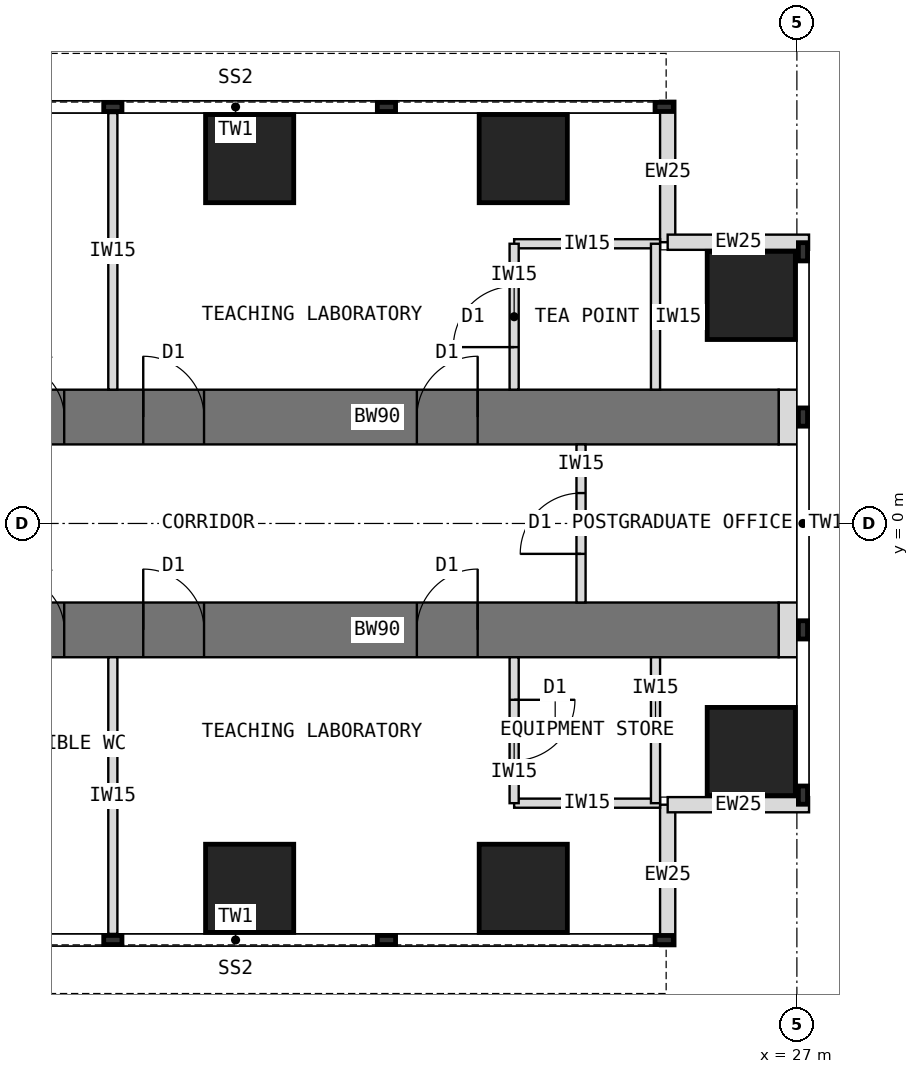
"""IFC4 building model, lengths in metres.
Left out: names, types, materials, properties, quantities, classifications, styles, units other than length and angle.
Written with IfcOpenShell. Run it as: python <this file> out.ifc"""

import sys

from ifc_helpers import new_model, si_unit, direction, frame, frame_2d, origin, origin_2d, place, context, subcontext, project, spatial, rectangle, extrude, element, fill, save


model = new_model("IFC4")
c1 = context("Model", 3, precision=1e-05, world=origin(), true_north=direction((0.0, 1.0)))
c2 = subcontext(c1, "Body", "Model", "MODEL_VIEW")
j1 = project(units=[si_unit("LENGTHUNIT", "METRE"), si_unit("PLANEANGLEUNIT", "RADIAN")], contexts=[c1])
p1 = place(None, origin())
s1 = spatial("IfcSite", under=j1, at=p1, CompositionType="ELEMENT")
p2 = place(p1, origin())
s2 = spatial("IfcBuilding", under=s1, at=p2, CompositionType="ELEMENT")
p3 = place(p2, frame((0.0, 0.0, 56.5)))
s3 = spatial("IfcBuildingStorey", under=s2, at=p3, CompositionType="ELEMENT", Elevation=56.5)
p4 = place(p3, frame((13.5, 1.75, 0.0), z_axis=(0.0, 0.0, 1.0), x_axis=(1.0, 0.0, 0.0)))
e1 = element("IfcWall", 1, at=p4, inside=s3, PredefinedType="SHEAR", context=c2, shape_type="SweptSolid", body=[
    extrude(rectangle(XDim=13.2, YDim=0.9, at=frame_2d((6.6, 0.0))), origin(), (0.0, 0.0, 1.0), 4.0),
])
p5 = place(p4, frame((0.55, 0.0, 0.0)))
e2 = element("IfcOpeningElement", 2, at=p5, cuts=e1, PredefinedType="OPENING", context=c2, shape_type="SweptSolid", body=[
    extrude(rectangle(XDim=0.9, YDim=2.1, at=frame_2d((0.45, 1.05))), frame((0.0, 0.46, 0.0), z_axis=(0.0, -1.0, 0.0), x_axis=(1.0, 0.0, 0.0)), (0.0, 0.0, 1.0), 0.92),
])
p6 = place(p4, frame((2.75, 0.0, 0.0)))
e3 = element("IfcOpeningElement", 3, at=p6, cuts=e1, PredefinedType="OPENING", context=c2, shape_type="SweptSolid", body=[
    extrude(rectangle(XDim=1.0, YDim=2.1, at=frame_2d((0.5, 1.05))), frame((0.0, 0.46, 0.0), z_axis=(0.0, -1.0, 0.0), x_axis=(1.0, 0.0, 0.0)), (0.0, 0.0, 1.0), 0.92),
])
p7 = place(p4, frame((7.25, 0.0, 0.0)))
e4 = element("IfcOpeningElement", 4, at=p7, cuts=e1, PredefinedType="OPENING", context=c2, shape_type="SweptSolid", body=[
    extrude(rectangle(XDim=1.0, YDim=2.1, at=frame_2d((0.5, 1.05))), frame((0.0, 0.46, 0.0), z_axis=(0.0, -1.0, 0.0), x_axis=(1.0, 0.0, 0.0)), (0.0, 0.0, 1.0), 0.92),
])
p8 = place(p3, frame((13.5, -1.75, 0.0), z_axis=(0.0, 0.0, 1.0), x_axis=(1.0, 0.0, 0.0)))
e5 = element("IfcWall", 5, at=p8, inside=s3, PredefinedType="SHEAR", context=c2, shape_type="SweptSolid", body=[
    extrude(rectangle(XDim=13.2, YDim=0.9, at=frame_2d((6.6, 0.0))), origin(), (0.0, 0.0, 1.0), 4.0),
])
p9 = place(p8, frame((0.55, 0.0, 0.0)))
e6 = element("IfcOpeningElement", 6, at=p9, cuts=e5, PredefinedType="OPENING", context=c2, shape_type="SweptSolid", body=[
    extrude(rectangle(XDim=0.9, YDim=2.1, at=frame_2d((0.45, 1.05))), frame((0.0, 0.46, 0.0), z_axis=(0.0, -1.0, 0.0), x_axis=(1.0, 0.0, 0.0)), (0.0, 0.0, 1.0), 0.92),
])
p10 = place(p8, frame((2.75, 0.0, 0.0)))
e7 = element("IfcOpeningElement", 7, at=p10, cuts=e5, PredefinedType="OPENING", context=c2, shape_type="SweptSolid", body=[
    extrude(rectangle(XDim=1.0, YDim=2.1, at=frame_2d((0.5, 1.05))), frame((0.0, 0.46, 0.0), z_axis=(0.0, -1.0, 0.0), x_axis=(1.0, 0.0, 0.0)), (0.0, 0.0, 1.0), 0.92),
])
p11 = place(p8, frame((7.25, 0.0, 0.0)))
e8 = element("IfcOpeningElement", 8, at=p11, cuts=e5, PredefinedType="OPENING", context=c2, shape_type="SweptSolid", body=[
    extrude(rectangle(XDim=1.0, YDim=2.1, at=frame_2d((0.5, 1.05))), frame((0.0, 0.46, 0.0), z_axis=(0.0, -1.0, 0.0), x_axis=(1.0, 0.0, 0.0)), (0.0, 0.0, 1.0), 0.92),
])
for number, where, z_axis, x_axis in (
    (9, (18.0, 6.0, 0.0), (0.0, 0.0, 1.0), (1.0, 0.0, 0.0)),
    (10, (18.0, -6.0, 0.0), (0.0, 0.0, 1.0), (1.0, 0.0, 0.0)),
    (11, (22.5, 6.0, 0.0), (0.0, 0.0, 1.0), (1.0, 0.0, 0.0)),
    (12, (22.5, -6.0, 0.0), (0.0, 0.0, 1.0), (1.0, 0.0, 0.0)),
    (13, (26.25, 3.75, 0.0), (0.0, 0.0, 1.0), (1.0, 0.0, 0.0)),
    (14, (26.25, -3.75, 0.0), (0.0, 0.0, 1.0), (1.0, 0.0, 0.0)),
):
    element("IfcColumn", number, at=place(p3, frame(where, z_axis=z_axis, x_axis=x_axis)), inside=s3, PredefinedType="COLUMN", context=c2, shape_type="SweptSolid", body=[
        extrude(rectangle(XDim=1.45, YDim=1.45, at=origin_2d()), origin(), (0.0, 0.0, 1.0), 4.0),
    ])
for number, where, z_axis, x_axis in (
    (15, (24.875, 6.95, 0.0), (0.0, 0.0, 1.0), (0.0, -1.0, 0.0)),
    (16, (24.875, 4.625, 0.0), (0.0, 0.0, 1.0), (1.0, 0.0, 0.0)),
    (17, (24.875, -6.95, 0.0), (0.0, 0.0, 1.0), (0.0, 1.0, 0.0)),
    (18, (24.875, -4.625, 0.0), (0.0, 0.0, 1.0), (1.0, 0.0, 0.0)),
):
    element("IfcWall", number, at=place(p3, frame(where, z_axis=z_axis, x_axis=x_axis)), inside=s3, PredefinedType="STANDARD", context=c2, shape_type="SweptSolid", body=[
        extrude(rectangle(XDim=2.325, YDim=0.25, at=frame_2d((1.163, 0.0))), origin(), (0.0, 0.0, 1.0), 3.8),
    ])
for number, where, z_axis, x_axis in (
    (19, (26.7, 1.75, 0.0), (0.0, 0.0, 1.0), (1.0, 0.0, 0.0)),
    (20, (26.7, -1.75, 0.0), (0.0, 0.0, 1.0), (1.0, 0.0, 0.0)),
):
    element("IfcWall", number, at=place(p3, frame(where, z_axis=z_axis, x_axis=x_axis)), inside=s3, PredefinedType="PARTITIONING", context=c2, shape_type="SweptSolid", body=[
        extrude(rectangle(XDim=0.31, YDim=0.9, at=frame_2d((0.155, 0.0))), origin(), (0.0, 0.0, 1.0), 3.8),
    ])
p12 = place(p3, frame((15.75, 2.2, 0.0), z_axis=(0.0, 0.0, 1.0), x_axis=(0.0, 1.0, 0.0)))
e21 = element("IfcWall", 21, at=p12, inside=s3, PredefinedType="PARTITIONING", context=c2, shape_type="SweptSolid", body=[
    extrude(rectangle(XDim=4.55, YDim=0.15, at=frame_2d((2.275, 0.0))), origin(), (0.0, 0.0, 1.0), 3.8),
])
p13 = place(p3, frame((22.35, 4.6, 0.0), z_axis=(0.0, 0.0, 1.0), x_axis=(1.0, 0.0, 0.0)))
e22 = element("IfcWall", 22, at=p13, inside=s3, PredefinedType="PARTITIONING", context=c2, shape_type="SweptSolid", body=[
    extrude(rectangle(XDim=2.4, YDim=0.15, at=frame_2d((1.2, 0.0))), origin(), (0.0, 0.0, 1.0), 3.8),
])
p14 = place(p3, frame((22.35, 2.2, 0.0), z_axis=(0.0, 0.0, 1.0), x_axis=(0.0, 1.0, 0.0)))
e23 = element("IfcWall", 23, at=p14, inside=s3, PredefinedType="PARTITIONING", context=c2, shape_type="SweptSolid", body=[
    extrude(rectangle(XDim=2.4, YDim=0.15, at=frame_2d((1.2, 0.0))), origin(), (0.0, 0.0, 1.0), 3.8),
])
p15 = place(p14, frame((0.7, 0.0, 0.0)))
e24 = element("IfcOpeningElement", 24, at=p15, cuts=e23, PredefinedType="OPENING", context=c2, shape_type="SweptSolid", body=[
    extrude(rectangle(XDim=1.0, YDim=2.1, at=frame_2d((0.5, 1.05))), frame((0.0, 0.085, 0.0), z_axis=(0.0, -1.0, 0.0), x_axis=(1.0, 0.0, 0.0)), (0.0, 0.0, 1.0), 0.17),
])
p16 = place(p3, frame((24.675, 2.2, 0.0), z_axis=(0.0, 0.0, 1.0), x_axis=(0.0, 1.0, 0.0)))
e25 = element("IfcWall", 25, at=p16, inside=s3, PredefinedType="PARTITIONING", context=c2, shape_type="SweptSolid", body=[
    extrude(rectangle(XDim=2.4, YDim=0.15, at=frame_2d((1.2, 0.0))), origin(), (0.0, 0.0, 1.0), 3.8),
])
p17 = place(p3, frame((15.75, -2.2, 0.0), z_axis=(0.0, 0.0, 1.0), x_axis=(0.0, -1.0, 0.0)))
e26 = element("IfcWall", 26, at=p17, inside=s3, PredefinedType="PARTITIONING", context=c2, shape_type="SweptSolid", body=[
    extrude(rectangle(XDim=4.55, YDim=0.15, at=frame_2d((2.275, 0.0))), origin(), (0.0, 0.0, 1.0), 3.8),
])
p18 = place(p3, frame((22.35, -4.6, 0.0), z_axis=(0.0, 0.0, 1.0), x_axis=(1.0, 0.0, 0.0)))
e27 = element("IfcWall", 27, at=p18, inside=s3, PredefinedType="PARTITIONING", context=c2, shape_type="SweptSolid", body=[
    extrude(rectangle(XDim=2.4, YDim=0.15, at=frame_2d((1.2, 0.0))), origin(), (0.0, 0.0, 1.0), 3.8),
])
p19 = place(p3, frame((22.35, -2.2, 0.0), z_axis=(0.0, 0.0, 1.0), x_axis=(0.0, -1.0, 0.0)))
e28 = element("IfcWall", 28, at=p19, inside=s3, PredefinedType="PARTITIONING", context=c2, shape_type="SweptSolid", body=[
    extrude(rectangle(XDim=2.4, YDim=0.15, at=frame_2d((1.2, 0.0))), origin(), (0.0, 0.0, 1.0), 3.8),
])
p20 = place(p19, frame((0.7, 0.0, 0.0)))
e29 = element("IfcOpeningElement", 29, at=p20, cuts=e28, PredefinedType="OPENING", context=c2, shape_type="SweptSolid", body=[
    extrude(rectangle(XDim=1.0, YDim=2.1, at=frame_2d((0.5, 1.05))), frame((0.0, 0.085, 0.0), z_axis=(0.0, -1.0, 0.0), x_axis=(1.0, 0.0, 0.0)), (0.0, 0.0, 1.0), 0.17),
])
p21 = place(p3, frame((24.675, -2.2, 0.0), z_axis=(0.0, 0.0, 1.0), x_axis=(0.0, -1.0, 0.0)))
e30 = element("IfcWall", 30, at=p21, inside=s3, PredefinedType="PARTITIONING", context=c2, shape_type="SweptSolid", body=[
    extrude(rectangle(XDim=2.4, YDim=0.15, at=frame_2d((1.2, 0.0))), origin(), (0.0, 0.0, 1.0), 3.8),
])
p22 = place(p3, frame((23.45, -1.3, 0.0), z_axis=(0.0, 0.0, 1.0), x_axis=(0.0, 1.0, 0.0)))
e31 = element("IfcWall", 31, at=p22, inside=s3, PredefinedType="PARTITIONING", context=c2, shape_type="SweptSolid", body=[
    extrude(rectangle(XDim=2.6, YDim=0.15, at=frame_2d((1.3, 0.0))), origin(), (0.0, 0.0, 1.0), 3.8),
])
p23 = place(p22, frame((0.8, 0.0, 0.0)))
e32 = element("IfcOpeningElement", 32, at=p23, cuts=e31, PredefinedType="OPENING", context=c2, shape_type="SweptSolid", body=[
    extrude(rectangle(XDim=1.0, YDim=2.1, at=frame_2d((0.5, 1.05))), frame((0.0, 0.085, 0.0), z_axis=(0.0, -1.0, 0.0), x_axis=(1.0, 0.0, 0.0)), (0.0, 0.0, 1.0), 0.17),
])
p24 = place(p15, origin())
e33 = element("IfcDoor", 33, at=p24, inside=s3, OperationType="SINGLE_SWING_LEFT", PredefinedType="DOOR", context=c2, shape_type="SweptSolid", body=[
    extrude(rectangle(XDim=1.0, YDim=2.1, at=frame_2d((0.5, 1.05))), frame((0.0, 0.025, 0.0), z_axis=(0.0, -1.0, 0.0), x_axis=(1.0, 0.0, 0.0)), (0.0, 0.0, 1.0), 0.05),
])
fill(e24, e33)
p25 = place(p20, origin())
e34 = element("IfcDoor", 34, at=p25, inside=s3, OperationType="SINGLE_SWING_LEFT", PredefinedType="DOOR", context=c2, shape_type="SweptSolid", body=[
    extrude(rectangle(XDim=1.0, YDim=2.1, at=frame_2d((0.5, 1.05))), frame((0.0, 0.025, 0.0), z_axis=(0.0, -1.0, 0.0), x_axis=(1.0, 0.0, 0.0)), (0.0, 0.0, 1.0), 0.05),
])
fill(e29, e34)
p26 = place(p23, origin())
e35 = element("IfcDoor", 35, at=p26, inside=s3, OperationType="SINGLE_SWING_LEFT", PredefinedType="DOOR", context=c2, shape_type="SweptSolid", body=[
    extrude(rectangle(XDim=1.0, YDim=2.1, at=frame_2d((0.5, 1.05))), frame((0.0, 0.025, 0.0), z_axis=(0.0, -1.0, 0.0), x_axis=(1.0, 0.0, 0.0)), (0.0, 0.0, 1.0), 0.05),
])
fill(e32, e35)
p27 = place(p5, origin())
e36 = element("IfcDoor", 36, at=p27, inside=s3, OperationType="SINGLE_SWING_LEFT", PredefinedType="DOOR", context=c2, shape_type="SweptSolid", body=[
    extrude(rectangle(XDim=0.82, YDim=2.06, at=frame_2d((0.45, 1.03))), frame((0.0, 0.025, 0.0), z_axis=(0.0, -1.0, 0.0), x_axis=(1.0, 0.0, 0.0)), (0.0, 0.0, 1.0), 0.05),
    extrude(rectangle(XDim=0.04, YDim=2.1, at=frame_2d((0.02, 1.05))), frame((0.0, 0.45, 0.0), z_axis=(0.0, -1.0, 0.0), x_axis=(1.0, 0.0, 0.0)), (0.0, 0.0, 1.0), 0.899),
    extrude(rectangle(XDim=0.04, YDim=2.1, at=frame_2d((0.88, 1.05))), frame((0.0, 0.45, 0.0), z_axis=(0.0, -1.0, 0.0), x_axis=(1.0, 0.0, 0.0)), (0.0, 0.0, 1.0), 0.899),
    extrude(rectangle(XDim=0.82, YDim=0.04, at=frame_2d((0.45, 2.08))), frame((0.0, 0.45, 0.0), z_axis=(0.0, -1.0, 0.0), x_axis=(1.0, 0.0, 0.0)), (0.0, 0.0, 1.0), 0.899),
])
fill(e2, e36)
p28 = place(p6, origin())
e37 = element("IfcDoor", 37, at=p28, inside=s3, OperationType="SINGLE_SWING_LEFT", PredefinedType="DOOR", context=c2, shape_type="SweptSolid", body=[
    extrude(rectangle(XDim=0.92, YDim=2.06, at=frame_2d((0.5, 1.03))), frame((0.0, 0.025, 0.0), z_axis=(0.0, -1.0, 0.0), x_axis=(1.0, 0.0, 0.0)), (0.0, 0.0, 1.0), 0.05),
    extrude(rectangle(XDim=0.04, YDim=2.1, at=frame_2d((0.02, 1.05))), frame((0.0, 0.45, 0.0), z_axis=(0.0, -1.0, 0.0), x_axis=(1.0, 0.0, 0.0)), (0.0, 0.0, 1.0), 0.899),
    extrude(rectangle(XDim=0.04, YDim=2.1, at=frame_2d((0.98, 1.05))), frame((0.0, 0.45, 0.0), z_axis=(0.0, -1.0, 0.0), x_axis=(1.0, 0.0, 0.0)), (0.0, 0.0, 1.0), 0.899),
    extrude(rectangle(XDim=0.92, YDim=0.04, at=frame_2d((0.5, 2.08))), frame((0.0, 0.45, 0.0), z_axis=(0.0, -1.0, 0.0), x_axis=(1.0, 0.0, 0.0)), (0.0, 0.0, 1.0), 0.899),
])
fill(e3, e37)
p29 = place(p7, origin())
e38 = element("IfcDoor", 38, at=p29, inside=s3, OperationType="SINGLE_SWING_RIGHT", PredefinedType="DOOR", context=c2, shape_type="SweptSolid", body=[
    extrude(rectangle(XDim=0.92, YDim=2.06, at=frame_2d((0.5, 1.03))), frame((0.0, 0.025, 0.0), z_axis=(0.0, -1.0, 0.0), x_axis=(1.0, 0.0, 0.0)), (0.0, 0.0, 1.0), 0.05),
    extrude(rectangle(XDim=0.04, YDim=2.1, at=frame_2d((0.02, 1.05))), frame((0.0, 0.45, 0.0), z_axis=(0.0, -1.0, 0.0), x_axis=(1.0, 0.0, 0.0)), (0.0, 0.0, 1.0), 0.899),
    extrude(rectangle(XDim=0.04, YDim=2.1, at=frame_2d((0.98, 1.05))), frame((0.0, 0.45, 0.0), z_axis=(0.0, -1.0, 0.0), x_axis=(1.0, 0.0, 0.0)), (0.0, 0.0, 1.0), 0.899),
    extrude(rectangle(XDim=0.92, YDim=0.04, at=frame_2d((0.5, 2.08))), frame((0.0, 0.45, 0.0), z_axis=(0.0, -1.0, 0.0), x_axis=(1.0, 0.0, 0.0)), (0.0, 0.0, 1.0), 0.899),
])
fill(e4, e38)
p30 = place(p9, origin())
e39 = element("IfcDoor", 39, at=p30, inside=s3, OperationType="SINGLE_SWING_LEFT", PredefinedType="DOOR", context=c2, shape_type="SweptSolid", body=[
    extrude(rectangle(XDim=0.82, YDim=2.06, at=frame_2d((0.45, 1.03))), frame((0.0, 0.025, 0.0), z_axis=(0.0, -1.0, 0.0), x_axis=(1.0, 0.0, 0.0)), (0.0, 0.0, 1.0), 0.05),
    extrude(rectangle(XDim=0.04, YDim=2.1, at=frame_2d((0.02, 1.05))), frame((0.0, 0.45, 0.0), z_axis=(0.0, -1.0, 0.0), x_axis=(1.0, 0.0, 0.0)), (0.0, 0.0, 1.0), 0.899),
    extrude(rectangle(XDim=0.04, YDim=2.1, at=frame_2d((0.88, 1.05))), frame((0.0, 0.45, 0.0), z_axis=(0.0, -1.0, 0.0), x_axis=(1.0, 0.0, 0.0)), (0.0, 0.0, 1.0), 0.899),
    extrude(rectangle(XDim=0.82, YDim=0.04, at=frame_2d((0.45, 2.08))), frame((0.0, 0.45, 0.0), z_axis=(0.0, -1.0, 0.0), x_axis=(1.0, 0.0, 0.0)), (0.0, 0.0, 1.0), 0.899),
])
fill(e6, e39)
p31 = place(p10, origin())
e40 = element("IfcDoor", 40, at=p31, inside=s3, OperationType="SINGLE_SWING_LEFT", PredefinedType="DOOR", context=c2, shape_type="SweptSolid", body=[
    extrude(rectangle(XDim=0.92, YDim=2.06, at=frame_2d((0.5, 1.03))), frame((0.0, 0.025, 0.0), z_axis=(0.0, -1.0, 0.0), x_axis=(1.0, 0.0, 0.0)), (0.0, 0.0, 1.0), 0.05),
    extrude(rectangle(XDim=0.04, YDim=2.1, at=frame_2d((0.02, 1.05))), frame((0.0, 0.45, 0.0), z_axis=(0.0, -1.0, 0.0), x_axis=(1.0, 0.0, 0.0)), (0.0, 0.0, 1.0), 0.899),
    extrude(rectangle(XDim=0.04, YDim=2.1, at=frame_2d((0.98, 1.05))), frame((0.0, 0.45, 0.0), z_axis=(0.0, -1.0, 0.0), x_axis=(1.0, 0.0, 0.0)), (0.0, 0.0, 1.0), 0.899),
    extrude(rectangle(XDim=0.92, YDim=0.04, at=frame_2d((0.5, 2.08))), frame((0.0, 0.45, 0.0), z_axis=(0.0, -1.0, 0.0), x_axis=(1.0, 0.0, 0.0)), (0.0, 0.0, 1.0), 0.899),
])
fill(e7, e40)
p32 = place(p11, origin())
e41 = element("IfcDoor", 41, at=p32, inside=s3, OperationType="SINGLE_SWING_RIGHT", PredefinedType="DOOR", context=c2, shape_type="SweptSolid", body=[
    extrude(rectangle(XDim=0.92, YDim=2.06, at=frame_2d((0.5, 1.03))), frame((0.0, 0.025, 0.0), z_axis=(0.0, -1.0, 0.0), x_axis=(1.0, 0.0, 0.0)), (0.0, 0.0, 1.0), 0.05),
    extrude(rectangle(XDim=0.04, YDim=2.1, at=frame_2d((0.02, 1.05))), frame((0.0, 0.45, 0.0), z_axis=(0.0, -1.0, 0.0), x_axis=(1.0, 0.0, 0.0)), (0.0, 0.0, 1.0), 0.899),
    extrude(rectangle(XDim=0.04, YDim=2.1, at=frame_2d((0.98, 1.05))), frame((0.0, 0.45, 0.0), z_axis=(0.0, -1.0, 0.0), x_axis=(1.0, 0.0, 0.0)), (0.0, 0.0, 1.0), 0.899),
    extrude(rectangle(XDim=0.92, YDim=0.04, at=frame_2d((0.5, 2.08))), frame((0.0, 0.45, 0.0), z_axis=(0.0, -1.0, 0.0), x_axis=(1.0, 0.0, 0.0)), (0.0, 0.0, 1.0), 0.899),
])
fill(e8, e41)
save(model, sys.argv[1])
